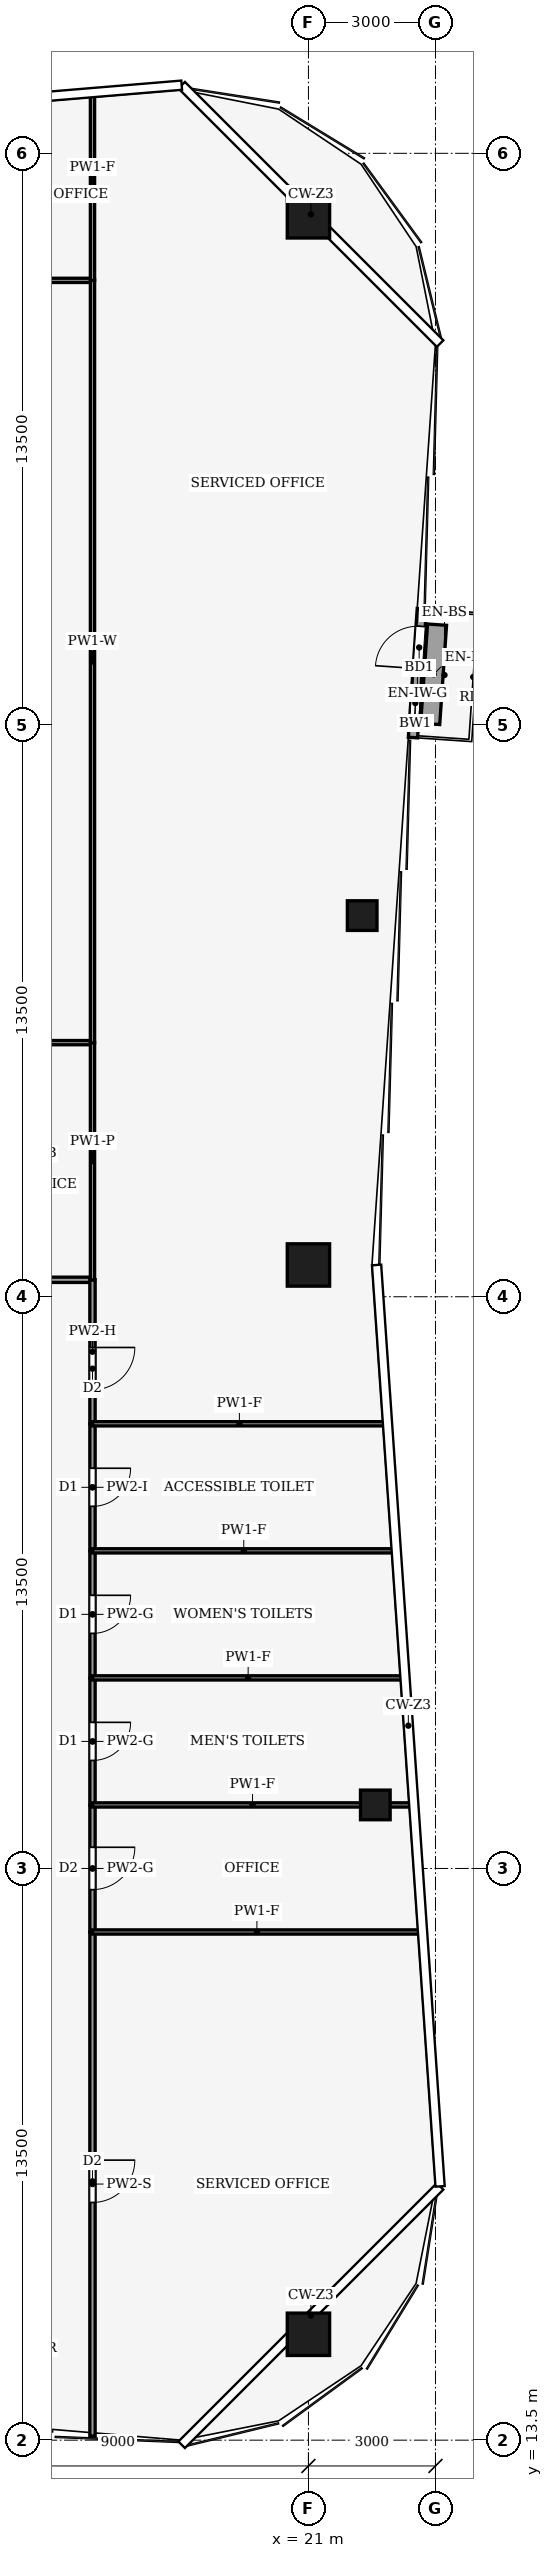
"""IFC4 building model, lengths in metres.
Left out: names, types, materials, properties, quantities, classifications, styles, units other than length and angle.
Written with IfcOpenShell. Run it as: python <this file> out.ifc"""

import sys

from ifc_helpers import new_model, si_unit, direction, frame, frame_2d, origin, origin_2d, place, context, subcontext, project, spatial, rectangle, hollow_rectangle, extrude, element, fill, save


model = new_model("IFC4")
c1 = context("Model", 3, precision=1e-05, world=origin(), true_north=direction((0.0, 1.0)))
c2 = subcontext(c1, "Body", "Model", "MODEL_VIEW")
j1 = project(units=[si_unit("LENGTHUNIT", "METRE"), si_unit("PLANEANGLEUNIT", "RADIAN")], contexts=[c1])
p1 = place(None, origin())
s1 = spatial("IfcSite", under=j1, at=p1, CompositionType="ELEMENT")
p2 = place(p1, origin())
s2 = spatial("IfcBuilding", under=s1, at=p2, CompositionType="ELEMENT")
p3 = place(p2, frame((0.0, 0.0, 210.0)))
s3 = spatial("IfcBuildingStorey", under=s2, at=p3, CompositionType="ELEMENT", Elevation=210.0)
for number, where, z_axis, x_axis in (
    (1, (21.0, 66.0, 0.0), (0.0, 0.0, 1.0), (1.0, 0.0, 0.0)),
    (2, (21.0, 41.25, 0.0), (0.0, 0.0, 1.0), (1.0, 0.0, 0.0)),
    (3, (21.0, 16.0, 0.0), (0.0, 0.0, 1.0), (1.0, 0.0, 0.0)),
):
    element("IfcColumn", number, at=place(p3, frame(where, z_axis=z_axis, x_axis=x_axis)), inside=s3, PredefinedType="COLUMN", context=c2, shape_type="SweptSolid", body=[
        extrude(hollow_rectangle(XDim=1.0, YDim=1.0, WallThickness=0.06, at=origin_2d()), origin(), (0.0, 0.0, 1.0), 4.0),
    ])
for number, where, z_axis, x_axis in (
    (4, (22.579, 28.5, 0.0), (0.0, 0.0, 1.0), (1.0, 0.0, 0.0)),
    (5, (22.269, 49.5, 0.0), (0.0, 0.0, 1.0), (1.0, 0.0, 0.0)),
):
    element("IfcColumn", number, at=place(p3, frame(where, z_axis=z_axis, x_axis=x_axis)), inside=s3, PredefinedType="COLUMN", context=c2, shape_type="SweptSolid", body=[
        extrude(hollow_rectangle(XDim=0.7, YDim=0.7, WallThickness=0.03, at=origin_2d()), origin(), (0.0, 0.0, 1.0), 4.0),
    ])
p4 = place(p3, frame((23.468, 53.704, 0.0), z_axis=(0.0, 0.0, 1.0), x_axis=(0.068793846076, 0.997630897047, 0.0)))
e6 = element("IfcWall", 6, at=p4, inside=s3, PredefinedType="SOLIDWALL", context=c2, shape_type="SweptSolid", body=[
    extrude(rectangle(XDim=3.049, YDim=0.218, at=frame_2d((1.524, 0.0))), origin(), (0.0, 0.0, 1.0), 3.65),
])
p5 = place(p4, frame((1.632, 0.0, 0.0)))
e7 = element("IfcOpeningElement", 7, at=p5, cuts=e6, PredefinedType="OPENING", context=c2, shape_type="SweptSolid", body=[
    extrude(rectangle(XDim=1.0, YDim=2.1, at=frame_2d((0.5, 1.05))), frame((0.0, 0.119, 0.0), z_axis=(0.0, -1.0, 0.0), x_axis=(1.0, 0.0, 0.0)), (0.0, 0.0, 1.0), 0.238),
])
p6 = place(p4, frame((0.416, 0.0, 0.9)))
e8 = element("IfcOpeningElement", 8, at=p6, cuts=e6, PredefinedType="OPENING", context=c2, shape_type="SweptSolid", body=[
    extrude(rectangle(XDim=0.8, YDim=1.2, at=frame_2d((0.4, 0.6))), frame((0.0, 0.119, 0.0), z_axis=(0.0, -1.0, 0.0), x_axis=(1.0, 0.0, 0.0)), (0.0, 0.0, 1.0), 0.238),
])
p7 = place(p3, frame((23.875, 54.027, 0.0), z_axis=(0.0, 0.0, 1.0), x_axis=(0.068823499363, 0.997628851796, 0.0)))
e9 = element("IfcWall", 9, at=p7, inside=s3, PredefinedType="USERDEFINED", context=c2, shape_type="SweptSolid", body=[
    extrude(rectangle(XDim=2.348, YDim=0.45, at=frame_2d((1.174, 0.0))), origin(), (0.0, 0.0, 1.0), 0.4),
])
p8 = place(p3, frame((12.0, 40.9, 0.0), z_axis=(0.0, 0.0, 1.0), x_axis=(1.0, 0.0, 0.0)))
e10 = element("IfcWall", 10, at=p8, inside=s3, PredefinedType="PARTITIONING", context=c2, shape_type="SweptSolid", body=[
    extrude(rectangle(XDim=3.9, YDim=0.125, at=frame_2d((1.95, 0.0))), origin(), (0.0, 0.0, 1.0), 3.44),
])
p9 = place(p8, frame((1.45, 0.0, 0.0)))
e11 = element("IfcOpeningElement", 11, at=p9, cuts=e10, PredefinedType="OPENING", context=c2, shape_type="SweptSolid", body=[
    extrude(rectangle(XDim=1.0, YDim=2.1, at=frame_2d((0.5, 1.05))), frame((0.0, 0.073, 0.0), z_axis=(0.0, -1.0, 0.0), x_axis=(1.0, 0.0, 0.0)), (0.0, 0.0, 1.0), 0.145),
])
p10 = place(p3, frame((15.9, 25.5, 0.0), z_axis=(0.0, 0.0, 1.0), x_axis=(0.0, -1.0, 0.0)))
e12 = element("IfcWall", 12, at=p10, inside=s3, PredefinedType="PARTITIONING", context=c2, shape_type="SweptSolid", body=[
    extrude(rectangle(XDim=11.905, YDim=0.125, at=frame_2d((5.953, 0.0))), origin(), (0.0, 0.0, 1.0), 3.04),
])
p11 = place(p10, frame((5.387, 0.0, 0.0)))
e13 = element("IfcOpeningElement", 13, at=p11, cuts=e12, PredefinedType="OPENING", context=c2, shape_type="SweptSolid", body=[
    extrude(rectangle(XDim=1.0, YDim=2.1, at=frame_2d((0.5, 1.05))), frame((0.0, 0.073, 0.0), z_axis=(0.0, -1.0, 0.0), x_axis=(1.0, 0.0, 0.0)), (0.0, 0.0, 1.0), 0.145),
])
p12 = place(p3, frame((15.9, 28.5, 0.0), z_axis=(0.0, 0.0, 1.0), x_axis=(0.0, -1.0, 0.0)))
e14 = element("IfcWall", 14, at=p12, inside=s3, PredefinedType="PARTITIONING", context=c2, shape_type="SweptSolid", body=[
    extrude(rectangle(XDim=3.0, YDim=0.125, at=frame_2d((1.5, 0.0))), origin(), (0.0, 0.0, 1.0), 3.87),
])
p13 = place(p12, frame((1.0, 0.0, 0.0)))
e15 = element("IfcOpeningElement", 15, at=p13, cuts=e14, PredefinedType="OPENING", context=c2, shape_type="SweptSolid", body=[
    extrude(rectangle(XDim=1.0, YDim=2.1, at=frame_2d((0.5, 1.05))), frame((0.0, 0.073, 0.0), z_axis=(0.0, -1.0, 0.0), x_axis=(1.0, 0.0, 0.0)), (0.0, 0.0, 1.0), 0.145),
])
p14 = place(p3, frame((15.9, 31.5, 0.0), z_axis=(0.0, 0.0, 1.0), x_axis=(0.0, -1.0, 0.0)))
e16 = element("IfcWall", 16, at=p14, inside=s3, PredefinedType="PARTITIONING", context=c2, shape_type="SweptSolid", body=[
    extrude(rectangle(XDim=3.0, YDim=0.125, at=frame_2d((1.5, 0.0))), origin(), (0.0, 0.0, 1.0), 3.87),
])
p15 = place(p14, frame((1.05, 0.0, 0.0)))
e17 = element("IfcOpeningElement", 17, at=p15, cuts=e16, PredefinedType="OPENING", context=c2, shape_type="SweptSolid", body=[
    extrude(rectangle(XDim=0.9, YDim=2.1, at=frame_2d((0.45, 1.05))), frame((0.0, 0.073, 0.0), z_axis=(0.0, -1.0, 0.0), x_axis=(1.0, 0.0, 0.0)), (0.0, 0.0, 1.0), 0.145),
])
p16 = place(p3, frame((15.9, 34.5, 0.0), z_axis=(0.0, 0.0, 1.0), x_axis=(0.0, -1.0, 0.0)))
e18 = element("IfcWall", 18, at=p16, inside=s3, PredefinedType="PARTITIONING", context=c2, shape_type="SweptSolid", body=[
    extrude(rectangle(XDim=3.0, YDim=0.125, at=frame_2d((1.5, 0.0))), origin(), (0.0, 0.0, 1.0), 3.87),
])
p17 = place(p16, frame((1.05, 0.0, 0.0)))
e19 = element("IfcOpeningElement", 19, at=p17, cuts=e18, PredefinedType="OPENING", context=c2, shape_type="SweptSolid", body=[
    extrude(rectangle(XDim=0.9, YDim=2.1, at=frame_2d((0.45, 1.05))), frame((0.0, 0.073, 0.0), z_axis=(0.0, -1.0, 0.0), x_axis=(1.0, 0.0, 0.0)), (0.0, 0.0, 1.0), 0.145),
])
p18 = place(p3, frame((15.9, 37.5, 0.0), z_axis=(0.0, 0.0, 1.0), x_axis=(0.0, -1.0, 0.0)))
e20 = element("IfcWall", 20, at=p18, inside=s3, PredefinedType="PARTITIONING", context=c2, shape_type="SweptSolid", body=[
    extrude(rectangle(XDim=3.0, YDim=0.125, at=frame_2d((1.5, 0.0))), origin(), (0.0, 0.0, 1.0), 3.48),
])
p19 = place(p18, frame((1.05, 0.0, 0.0)))
e21 = element("IfcOpeningElement", 21, at=p19, cuts=e20, PredefinedType="OPENING", context=c2, shape_type="SweptSolid", body=[
    extrude(rectangle(XDim=0.9, YDim=2.1, at=frame_2d((0.45, 1.05))), frame((0.0, 0.073, 0.0), z_axis=(0.0, -1.0, 0.0), x_axis=(1.0, 0.0, 0.0)), (0.0, 0.0, 1.0), 0.145),
])
p20 = place(p3, frame((15.9, 40.904, 0.0), z_axis=(0.0, 0.0, 1.0), x_axis=(0.0, -1.0, 0.0)))
e22 = element("IfcWall", 22, at=p20, inside=s3, PredefinedType="PARTITIONING", context=c2, shape_type="SweptSolid", body=[
    extrude(rectangle(XDim=3.404, YDim=0.125, at=frame_2d((1.702, 0.0))), origin(), (0.0, 0.0, 1.0), 3.14),
])
p21 = place(p20, frame((1.602, 0.0, 0.0)))
e23 = element("IfcOpeningElement", 23, at=p21, cuts=e22, PredefinedType="OPENING", context=c2, shape_type="SweptSolid", body=[
    extrude(rectangle(XDim=1.0, YDim=2.1, at=frame_2d((0.5, 1.05))), frame((0.0, 0.073, 0.0), z_axis=(0.0, -1.0, 0.0), x_axis=(1.0, 0.0, 0.0)), (0.0, 0.0, 1.0), 0.145),
])
p22 = place(p3, frame((15.9, 46.5, 0.0), z_axis=(0.0, 0.0, 1.0), x_axis=(-1.0, 0.0, 0.0)))
e24 = element("IfcWall", 24, at=p22, inside=s3, PredefinedType="PARTITIONING", context=c2, shape_type="SweptSolid", body=[
    extrude(rectangle(XDim=3.904, YDim=0.1, at=frame_2d((1.952, 0.0))), origin(), (0.0, 0.0, 1.0), 3.87),
])
p23 = place(p3, frame((15.9, 40.896, 0.0), z_axis=(0.0, 0.0, 1.0), x_axis=(0.0, 1.0, 0.0)))
e25 = element("IfcWall", 25, at=p23, inside=s3, PredefinedType="PARTITIONING", context=c2, shape_type="SweptSolid", body=[
    extrude(rectangle(XDim=5.608, YDim=0.1, at=frame_2d((2.804, 0.0))), origin(), (0.0, 0.0, 1.0), 3.44),
])
p24 = place(p3, frame((3.0, 64.5, 0.0), z_axis=(0.0, 0.0, 1.0), x_axis=(1.0, 0.0, 0.0)))
e26 = element("IfcWall", 26, at=p24, inside=s3, PredefinedType="PARTITIONING", context=c2, shape_type="SweptSolid", body=[
    extrude(rectangle(XDim=12.9, YDim=0.1, at=frame_2d((6.45, 0.0))), origin(), (0.0, 0.0, 1.0), 3.24),
])
p25 = place(p24, frame((5.95, 0.0, 0.0)))
e27 = element("IfcOpeningElement", 27, at=p25, cuts=e26, PredefinedType="OPENING", context=c2, shape_type="SweptSolid", body=[
    extrude(rectangle(XDim=1.0, YDim=2.1, at=frame_2d((0.5, 1.05))), frame((0.0, 0.06, 0.0), z_axis=(0.0, -1.0, 0.0), x_axis=(1.0, 0.0, 0.0)), (0.0, 0.0, 1.0), 0.12),
])
p26 = place(p3, frame((15.9, 46.496, 0.0), z_axis=(0.0, 0.0, 1.0), x_axis=(0.0, 1.0, 0.0)))
e28 = element("IfcWall", 28, at=p26, inside=s3, PredefinedType="PARTITIONING", context=c2, shape_type="SweptSolid", body=[
    extrude(rectangle(XDim=18.008, YDim=0.1, at=frame_2d((9.004, 0.0))), origin(), (0.0, 0.0, 1.0), 3.24),
])
p27 = place(p3, frame((15.9, 64.496, 0.0), z_axis=(0.0, 0.0, 1.0), x_axis=(0.0, 1.0, 0.0)))
e29 = element("IfcWall", 29, at=p27, inside=s3, PredefinedType="PARTITIONING", context=c2, shape_type="SweptSolid", body=[
    extrude(rectangle(XDim=4.409, YDim=0.1, at=frame_2d((2.205, 0.0))), origin(), (0.0, 0.0, 1.0), 3.04),
])
p28 = place(p3, frame((23.666, 25.5, 0.0), z_axis=(0.0, 0.0, 1.0), x_axis=(-1.0, 0.0, 0.0)))
e30 = element("IfcWall", 30, at=p28, inside=s3, PredefinedType="PARTITIONING", context=c2, shape_type="SweptSolid", body=[
    extrude(rectangle(XDim=7.766, YDim=0.1, at=frame_2d((3.883, 0.0))), origin(), (0.0, 0.0, 1.0), 3.04),
])
p29 = place(p3, frame((23.459, 28.5, 0.0), z_axis=(0.0, 0.0, 1.0), x_axis=(-1.0, 0.0, 0.0)))
e31 = element("IfcWall", 31, at=p29, inside=s3, PredefinedType="PARTITIONING", context=c2, shape_type="SweptSolid", body=[
    extrude(rectangle(XDim=7.559, YDim=0.1, at=frame_2d((3.78, 0.0))), origin(), (0.0, 0.0, 1.0), 3.04),
])
p30 = place(p3, frame((23.252, 31.5, 0.0), z_axis=(0.0, 0.0, 1.0), x_axis=(-1.0, 0.0, 0.0)))
e32 = element("IfcWall", 32, at=p30, inside=s3, PredefinedType="PARTITIONING", context=c2, shape_type="SweptSolid", body=[
    extrude(rectangle(XDim=7.353, YDim=0.1, at=frame_2d((3.676, 0.0))), origin(), (0.0, 0.0, 1.0), 3.04),
])
p31 = place(p3, frame((23.045, 34.5, 0.0), z_axis=(0.0, 0.0, 1.0), x_axis=(-1.0, 0.0, 0.0)))
e33 = element("IfcWall", 33, at=p31, inside=s3, PredefinedType="PARTITIONING", context=c2, shape_type="SweptSolid", body=[
    extrude(rectangle(XDim=7.146, YDim=0.1, at=frame_2d((3.573, 0.0))), origin(), (0.0, 0.0, 1.0), 3.04),
])
p32 = place(p3, frame((22.839, 37.5, 0.0), z_axis=(0.0, 0.0, 1.0), x_axis=(-1.0, 0.0, 0.0)))
e34 = element("IfcWall", 34, at=p32, inside=s3, PredefinedType="PARTITIONING", context=c2, shape_type="SweptSolid", body=[
    extrude(rectangle(XDim=6.939, YDim=0.1, at=frame_2d((3.469, 0.0))), origin(), (0.0, 0.0, 1.0), 3.04),
])
p33 = place(p5, origin())
e35 = element("IfcDoor", 35, at=p33, inside=s3, OperationType="SINGLE_SWING_RIGHT", PredefinedType="DOOR", context=c2, shape_type="SweptSolid", body=[
    extrude(rectangle(XDim=1.0, YDim=2.1, at=frame_2d((0.5, 1.05))), frame((0.0, 0.025, 0.0), z_axis=(0.0, -1.0, 0.0), x_axis=(1.0, 0.0, 0.0)), (0.0, 0.0, 1.0), 0.05),
])
fill(e7, e35)
p34 = place(p6, origin())
e36 = element("IfcWindow", 36, at=p34, inside=s3, PartitioningType="SINGLE_PANEL", PredefinedType="WINDOW", context=c2, shape_type="SweptSolid", body=[
    extrude(rectangle(XDim=0.8, YDim=1.2, at=frame_2d((0.4, 0.6))), frame((0.0, 0.03, 0.0), z_axis=(0.0, -1.0, 0.0), x_axis=(1.0, 0.0, 0.0)), (0.0, 0.0, 1.0), 0.06),
])
fill(e8, e36)
p35 = place(p11, origin())
e37 = element("IfcDoor", 37, at=p35, inside=s3, OperationType="SINGLE_SWING_LEFT", PredefinedType="DOOR", context=c2, shape_type="SweptSolid", body=[
    extrude(rectangle(XDim=1.0, YDim=2.1, at=frame_2d((0.5, 1.05))), frame((0.0, 0.025, 0.0), z_axis=(0.0, -1.0, 0.0), x_axis=(1.0, 0.0, 0.0)), (0.0, 0.0, 1.0), 0.05),
])
fill(e13, e37)
p36 = place(p13, origin())
e38 = element("IfcDoor", 38, at=p36, inside=s3, OperationType="SINGLE_SWING_LEFT", PredefinedType="DOOR", context=c2, shape_type="SweptSolid", body=[
    extrude(rectangle(XDim=1.0, YDim=2.1, at=frame_2d((0.5, 1.05))), frame((0.0, 0.025, 0.0), z_axis=(0.0, -1.0, 0.0), x_axis=(1.0, 0.0, 0.0)), (0.0, 0.0, 1.0), 0.05),
])
fill(e15, e38)
p37 = place(p15, origin())
e39 = element("IfcDoor", 39, at=p37, inside=s3, OperationType="SINGLE_SWING_RIGHT", PredefinedType="DOOR", context=c2, shape_type="SweptSolid", body=[
    extrude(rectangle(XDim=0.9, YDim=2.1, at=frame_2d((0.45, 1.05))), frame((0.0, 0.025, 0.0), z_axis=(0.0, -1.0, 0.0), x_axis=(1.0, 0.0, 0.0)), (0.0, 0.0, 1.0), 0.05),
])
fill(e17, e39)
p38 = place(p17, origin())
e40 = element("IfcDoor", 40, at=p38, inside=s3, OperationType="SINGLE_SWING_LEFT", PredefinedType="DOOR", context=c2, shape_type="SweptSolid", body=[
    extrude(rectangle(XDim=0.9, YDim=2.1, at=frame_2d((0.45, 1.05))), frame((0.0, 0.025, 0.0), z_axis=(0.0, -1.0, 0.0), x_axis=(1.0, 0.0, 0.0)), (0.0, 0.0, 1.0), 0.05),
])
fill(e19, e40)
p39 = place(p19, origin())
e41 = element("IfcDoor", 41, at=p39, inside=s3, OperationType="SINGLE_SWING_RIGHT", PredefinedType="DOOR", context=c2, shape_type="SweptSolid", body=[
    extrude(rectangle(XDim=0.9, YDim=2.1, at=frame_2d((0.45, 1.05))), frame((0.0, 0.025, 0.0), z_axis=(0.0, -1.0, 0.0), x_axis=(1.0, 0.0, 0.0)), (0.0, 0.0, 1.0), 0.05),
])
fill(e21, e41)
p40 = place(p21, origin())
e42 = element("IfcDoor", 42, at=p40, inside=s3, OperationType="SINGLE_SWING_RIGHT", PredefinedType="DOOR", context=c2, shape_type="SweptSolid", body=[
    extrude(rectangle(XDim=1.0, YDim=2.1, at=frame_2d((0.5, 1.05))), frame((0.0, 0.025, 0.0), z_axis=(0.0, -1.0, 0.0), x_axis=(1.0, 0.0, 0.0)), (0.0, 0.0, 1.0), 0.05),
])
fill(e23, e42)
save(model, sys.argv[1])
